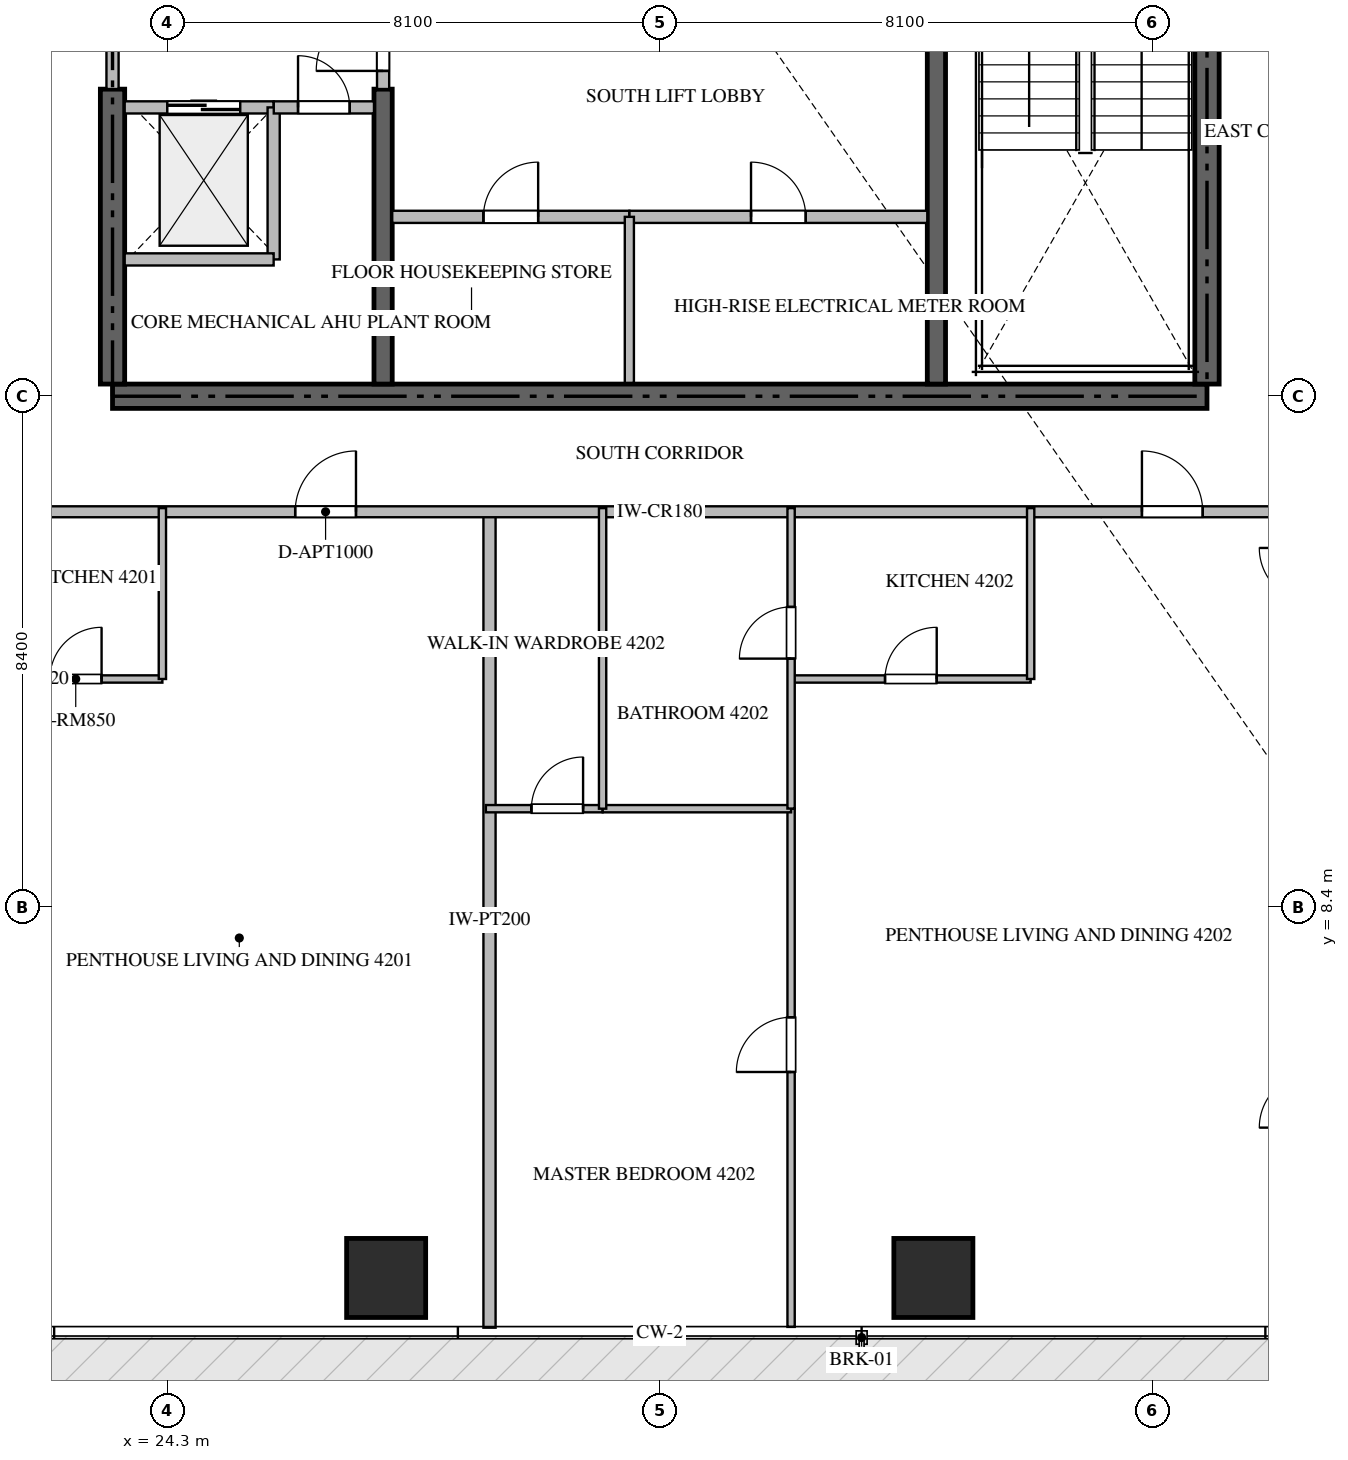
"""IFC4 building model, lengths in metres.
Left out: names, types, materials, properties, quantities, classifications, styles, units other than length and angle.
Written with IfcOpenShell. Run it as: python <this file> out.ifc"""

import sys

from ifc_helpers import new_model, si_unit, direction, frame, frame_2d, origin, origin_2d, place, context, subcontext, project, spatial, rectangle, extrude, source, transform, mapped, element, fill, save


model = new_model("IFC4")
c1 = context("Model", 3, precision=1e-05, world=origin(), true_north=direction((0.0, 1.0)))
c2 = subcontext(c1, "Body", "Model", "MODEL_VIEW")
j1 = project(units=[si_unit("LENGTHUNIT", "METRE"), si_unit("PLANEANGLEUNIT", "RADIAN")], contexts=[c1])
p1 = place(None, origin())
s1 = spatial("IfcSite", under=j1, at=p1, CompositionType="ELEMENT")
p2 = place(p1, origin())
s2 = spatial("IfcBuilding", under=s1, at=p2, CompositionType="ELEMENT")
p3 = place(p2, frame((0.0, 0.0, 168.9)))
s3 = spatial("IfcBuildingStorey", under=s2, at=p3, CompositionType="ELEMENT", Elevation=168.9)
p4 = place(p3, frame((23.4, 16.8, -0.26), z_axis=(0.0, 0.0, 1.0), x_axis=(1.0, 0.0, 0.0)))
e1 = element("IfcWall", 1, at=p4, inside=s3, PredefinedType="SHEAR", context=c2, shape_type="SweptSolid", body=[
    extrude(rectangle(XDim=18.0, YDim=0.4, at=frame_2d((9.0, 0.0))), origin(), (0.0, 0.0, 1.0), 3.748),
])
p5 = place(p3, frame((23.4, 17.0, -0.26), z_axis=(0.0, 0.0, 1.0), x_axis=(0.0, 1.0, 0.0)))
e2 = element("IfcWall", 2, at=p5, inside=s3, PredefinedType="SHEAR", context=c2, shape_type="SweptSolid", body=[
    extrude(rectangle(XDim=4.85, YDim=0.4, at=frame_2d((2.425, 0.0))), origin(), (0.0, 0.0, 1.0), 3.748),
])
p6 = place(p3, frame((41.4, 17.0, -0.26), z_axis=(0.0, 0.0, 1.0), x_axis=(0.0, 1.0, 0.0)))
e3 = element("IfcWall", 3, at=p6, inside=s3, PredefinedType="SHEAR", context=c2, shape_type="SweptSolid", body=[
    extrude(rectangle(XDim=8.35, YDim=0.4, at=frame_2d((4.175, 0.0))), origin(), (0.0, 0.0, 1.0), 3.748),
])
p7 = place(p3, frame((27.85, 17.0, -0.26), z_axis=(0.0, 0.0, 1.0), x_axis=(0.0, 1.0, 0.0)))
e4 = element("IfcWall", 4, at=p7, inside=s3, PredefinedType="SHEAR", context=c2, shape_type="SweptSolid", body=[
    extrude(rectangle(XDim=4.85, YDim=0.3, at=frame_2d((2.425, 0.0))), origin(), (0.0, 0.0, 1.0), 3.748),
])
p8 = place(p3, frame((36.95, 17.0, -0.26), z_axis=(0.0, 0.0, 1.0), x_axis=(0.0, 1.0, 0.0)))
e5 = element("IfcWall", 5, at=p8, inside=s3, PredefinedType="SHEAR", context=c2, shape_type="SweptSolid", body=[
    extrude(rectangle(XDim=8.35, YDim=0.3, at=frame_2d((4.175, 0.0))), origin(), (0.0, 0.0, 1.0), 3.748),
])
m1 = source(origin(), c2, "Body", "SweptSolid", [
    extrude(rectangle(XDim=1.3, YDim=1.3, at=origin_2d()), origin(), (0.0, 0.0, 1.0), 3.75),
])
for number, where, z_axis, x_axis in (
    (6, (27.9, 2.3, -0.26), (0.0, 0.0, 1.0), (1.0, 0.0, 0.0)),
    (7, (36.9, 2.3, -0.26), (0.0, 0.0, 1.0), (1.0, 0.0, 0.0)),
):
    element("IfcColumn", number, at=place(p3, frame(where, z_axis=z_axis, x_axis=x_axis)), inside=s3, PredefinedType="COLUMN", context=c2, shape_type="MappedRepresentation", body=[
        mapped(m1, transform((0.0, 0.0, 0.0), scale=1.0)),
    ])
p9 = place(p3, frame((23.6, 21.55, 0.0), z_axis=(0.0, 0.0, 1.0), x_axis=(1.0, 0.0, 0.0)))
e8 = element("IfcWall", 8, at=p9, inside=s3, PredefinedType="STANDARD", context=c2, shape_type="SweptSolid", body=[
    extrude(rectangle(XDim=2.45, YDim=0.2, at=frame_2d((1.225, 0.0))), origin(), (0.0, 0.0, 1.0), 3.49),
])
p10 = place(p9, frame((0.7, 0.0, 0.0)))
e9 = element("IfcOpeningElement", 9, at=p10, cuts=e8, PredefinedType="OPENING", context=c2, shape_type="SweptSolid", body=[
    extrude(rectangle(XDim=1.2, YDim=2.2, at=frame_2d((0.6, 1.1))), frame((0.0, 0.11, 0.0), z_axis=(0.0, -1.0, 0.0), x_axis=(1.0, 0.0, 0.0)), (0.0, 0.0, 1.0), 0.22),
])
p11 = place(p3, frame((26.05, 19.05, 0.0), z_axis=(0.0, 0.0, 1.0), x_axis=(0.0, 1.0, 0.0)))
e10 = element("IfcWall", 10, at=p11, inside=s3, PredefinedType="STANDARD", context=c2, shape_type="SweptSolid", body=[
    extrude(rectangle(XDim=2.5, YDim=0.2, at=frame_2d((1.25, 0.0))), origin(), (0.0, 0.0, 1.0), 3.49),
])
p12 = place(p3, frame((23.6, 19.05, 0.0), z_axis=(0.0, 0.0, 1.0), x_axis=(1.0, 0.0, 0.0)))
e11 = element("IfcWall", 11, at=p12, inside=s3, PredefinedType="STANDARD", context=c2, shape_type="SweptSolid", body=[
    extrude(rectangle(XDim=2.45, YDim=0.2, at=frame_2d((1.225, 0.0))), origin(), (0.0, 0.0, 1.0), 3.49),
])
p13 = place(p3, frame((26.052, 21.55, 0.0), z_axis=(0.0, 0.0, 1.0), x_axis=(1.0, 0.0, 0.0)))
e12 = element("IfcWall", 12, at=p13, inside=s3, PredefinedType="STANDARD", context=c2, shape_type="SweptSolid", body=[
    extrude(rectangle(XDim=1.648, YDim=0.2, at=frame_2d((0.824, 0.0))), origin(), (0.0, 0.0, 1.0), 3.49),
])
p14 = place(p13, frame((0.399, 0.0, 0.0)))
e13 = element("IfcOpeningElement", 13, at=p14, cuts=e12, PredefinedType="OPENING", context=c2, shape_type="SweptSolid", body=[
    extrude(rectangle(XDim=0.85, YDim=2.1, at=frame_2d((0.425, 1.05))), frame((0.0, 0.11, 0.0), z_axis=(0.0, -1.0, 0.0), x_axis=(1.0, 0.0, 0.0)), (0.0, 0.0, 1.0), 0.22),
])
p15 = place(p3, frame((23.4, 21.852, 0.0), z_axis=(0.0, 0.0, 1.0), x_axis=(0.0, 1.0, 0.0)))
e14 = element("IfcWall", 14, at=p15, inside=s3, PredefinedType="STANDARD", context=c2, shape_type="SweptSolid", body=[
    extrude(rectangle(XDim=2.396, YDim=0.2, at=frame_2d((1.198, 0.0))), origin(), (0.0, 0.0, 1.0), 3.49),
])
p16 = place(p15, frame((0.648, 0.0, 0.0)))
e15 = element("IfcOpeningElement", 15, at=p16, cuts=e14, PredefinedType="OPENING", context=c2, shape_type="SweptSolid", body=[
    extrude(rectangle(XDim=1.1, YDim=2.15, at=frame_2d((0.55, 1.075))), frame((0.0, 0.11, 0.0), z_axis=(0.0, -1.0, 0.0), x_axis=(1.0, 0.0, 0.0)), (0.0, 0.0, 1.0), 0.22),
])
p17 = place(p3, frame((27.85, 21.852, 0.0), z_axis=(0.0, 0.0, 1.0), x_axis=(0.0, 1.0, 0.0)))
e16 = element("IfcWall", 16, at=p17, inside=s3, PredefinedType="STANDARD", context=c2, shape_type="SweptSolid", body=[
    extrude(rectangle(XDim=1.696, YDim=0.2, at=frame_2d((0.848, 0.0))), origin(), (0.0, 0.0, 1.0), 3.49),
])
p18 = place(p17, frame((0.298, 0.0, 0.0)))
e17 = element("IfcOpeningElement", 17, at=p18, cuts=e16, PredefinedType="OPENING", context=c2, shape_type="SweptSolid", body=[
    extrude(rectangle(XDim=1.1, YDim=2.15, at=frame_2d((0.55, 1.075))), frame((0.0, 0.11, 0.0), z_axis=(0.0, -1.0, 0.0), x_axis=(1.0, 0.0, 0.0)), (0.0, 0.0, 1.0), 0.22),
])
p19 = place(p3, frame((28.0, 19.75, 0.0), z_axis=(0.0, 0.0, 1.0), x_axis=(1.0, 0.0, 0.0)))
e18 = element("IfcWall", 18, at=p19, inside=s3, PredefinedType="STANDARD", context=c2, shape_type="SweptSolid", body=[
    extrude(rectangle(XDim=3.9, YDim=0.2, at=frame_2d((1.95, 0.0))), origin(), (0.0, 0.0, 1.0), 3.49),
])
p20 = place(p19, frame((1.5, 0.0, 0.0)))
e19 = element("IfcOpeningElement", 19, at=p20, cuts=e18, PredefinedType="OPENING", context=c2, shape_type="SweptSolid", body=[
    extrude(rectangle(XDim=0.9, YDim=2.1, at=frame_2d((0.45, 1.05))), frame((0.0, 0.11, 0.0), z_axis=(0.0, -1.0, 0.0), x_axis=(1.0, 0.0, 0.0)), (0.0, 0.0, 1.0), 0.22),
])
p21 = place(p3, frame((31.902, 19.75, 0.0), z_axis=(0.0, 0.0, 1.0), x_axis=(1.0, 0.0, 0.0)))
e20 = element("IfcWall", 20, at=p21, inside=s3, PredefinedType="STANDARD", context=c2, shape_type="SweptSolid", body=[
    extrude(rectangle(XDim=4.898, YDim=0.2, at=frame_2d((2.449, 0.0))), origin(), (0.0, 0.0, 1.0), 3.49),
])
p22 = place(p21, frame((1.999, 0.0, 0.0)))
e21 = element("IfcOpeningElement", 21, at=p22, cuts=e20, PredefinedType="OPENING", context=c2, shape_type="SweptSolid", body=[
    extrude(rectangle(XDim=0.9, YDim=2.1, at=frame_2d((0.45, 1.05))), frame((0.0, 0.11, 0.0), z_axis=(0.0, -1.0, 0.0), x_axis=(1.0, 0.0, 0.0)), (0.0, 0.0, 1.0), 0.22),
])
p23 = place(p3, frame((31.9, 17.02, 0.0), z_axis=(0.0, 0.0, 1.0), x_axis=(0.0, 1.0, 0.0)))
e22 = element("IfcWall", 22, at=p23, inside=s3, PredefinedType="PARTITIONING", context=c2, shape_type="SweptSolid", body=[
    extrude(rectangle(XDim=2.73, YDim=0.15, at=frame_2d((1.365, 0.0))), origin(), (0.0, 0.0, 1.0), 3.49),
])
p24 = place(p3, frame((29.6, 1.482, 0.0), z_axis=(0.0, 0.0, 1.0), x_axis=(0.0, 1.0, 0.0)))
e23 = element("IfcWall", 23, at=p24, inside=s3, PredefinedType="PARTITIONING", context=c2, shape_type="SweptSolid", body=[
    extrude(rectangle(XDim=13.418, YDim=0.2, at=frame_2d((6.709, 0.0))), origin(), (0.0, 0.0, 1.0), 3.49),
])
p25 = place(p3, frame((20.952, 14.9, 0.0), z_axis=(0.0, 0.0, 1.0), x_axis=(1.0, 0.0, 0.0)))
e24 = element("IfcWall", 24, at=p25, inside=s3, PredefinedType="PARTITIONING", context=c2, shape_type="SweptSolid", body=[
    extrude(rectangle(XDim=22.896, YDim=0.18, at=frame_2d((11.448, 0.0))), origin(), (0.0, 0.0, 1.0), 3.49),
])
p26 = place(p25, frame((5.452, 0.0, 0.0)))
e25 = element("IfcOpeningElement", 25, at=p26, cuts=e24, PredefinedType="OPENING", context=c2, shape_type="SweptSolid", body=[
    extrude(rectangle(XDim=1.0, YDim=2.15, at=frame_2d((0.5, 1.075))), frame((0.0, 0.1, 0.0), z_axis=(0.0, -1.0, 0.0), x_axis=(1.0, 0.0, 0.0)), (0.0, 0.0, 1.0), 0.2),
])
p27 = place(p25, frame((19.378, 0.0, 0.0)))
e26 = element("IfcOpeningElement", 26, at=p27, cuts=e24, PredefinedType="OPENING", context=c2, shape_type="SweptSolid", body=[
    extrude(rectangle(XDim=1.0, YDim=2.15, at=frame_2d((0.5, 1.075))), frame((0.0, 0.1, 0.0), z_axis=(0.0, -1.0, 0.0), x_axis=(1.0, 0.0, 0.0)), (0.0, 0.0, 1.0), 0.2),
])
p28 = place(p3, frame((21.37, 12.15, 0.0), z_axis=(0.0, 0.0, 1.0), x_axis=(1.0, 0.0, 0.0)))
e27 = element("IfcWall", 27, at=p28, inside=s3, PredefinedType="PARTITIONING", context=c2, shape_type="SweptSolid", body=[
    extrude(rectangle(XDim=2.85, YDim=0.12, at=frame_2d((1.425, 0.0))), origin(), (0.0, 0.0, 1.0), 3.49),
])
p29 = place(p28, frame((1.0, 0.0, 0.0)))
e28 = element("IfcOpeningElement", 28, at=p29, cuts=e27, PredefinedType="OPENING", context=c2, shape_type="SweptSolid", body=[
    extrude(rectangle(XDim=0.85, YDim=2.1, at=frame_2d((0.425, 1.05))), frame((0.0, 0.07, 0.0), z_axis=(0.0, -1.0, 0.0), x_axis=(1.0, 0.0, 0.0)), (0.0, 0.0, 1.0), 0.14),
])
p30 = place(p3, frame((24.22, 12.15, 0.0), z_axis=(0.0, 0.0, 1.0), x_axis=(0.0, 1.0, 0.0)))
e29 = element("IfcWall", 29, at=p30, inside=s3, PredefinedType="PARTITIONING", context=c2, shape_type="SweptSolid", body=[
    extrude(rectangle(XDim=2.81, YDim=0.12, at=frame_2d((1.405, 0.0))), origin(), (0.0, 0.0, 1.0), 3.49),
])
p31 = place(p3, frame((34.56, 12.15, 0.0), z_axis=(0.0, 0.0, 1.0), x_axis=(1.0, 0.0, 0.0)))
e30 = element("IfcWall", 30, at=p31, inside=s3, PredefinedType="PARTITIONING", context=c2, shape_type="SweptSolid", body=[
    extrude(rectangle(XDim=3.94, YDim=0.12, at=frame_2d((1.97, 0.0))), origin(), (0.0, 0.0, 1.0), 3.49),
])
p32 = place(p31, frame((1.545, 0.0, 0.0)))
e31 = element("IfcOpeningElement", 31, at=p32, cuts=e30, PredefinedType="OPENING", context=c2, shape_type="SweptSolid", body=[
    extrude(rectangle(XDim=0.85, YDim=2.1, at=frame_2d((0.425, 1.05))), frame((0.0, 0.07, 0.0), z_axis=(0.0, -1.0, 0.0), x_axis=(1.0, 0.0, 0.0)), (0.0, 0.0, 1.0), 0.14),
])
p33 = place(p3, frame((38.5, 12.15, 0.0), z_axis=(0.0, 0.0, 1.0), x_axis=(0.0, 1.0, 0.0)))
e32 = element("IfcWall", 32, at=p33, inside=s3, PredefinedType="PARTITIONING", context=c2, shape_type="SweptSolid", body=[
    extrude(rectangle(XDim=2.81, YDim=0.12, at=frame_2d((1.405, 0.0))), origin(), (0.0, 0.0, 1.0), 3.49),
])
p34 = place(p3, frame((34.56, 1.495, 0.0), z_axis=(0.0, 0.0, 1.0), x_axis=(0.0, 1.0, 0.0)))
e33 = element("IfcWall", 33, at=p34, inside=s3, PredefinedType="PARTITIONING", context=c2, shape_type="SweptSolid", body=[
    extrude(rectangle(XDim=8.522, YDim=0.12, at=frame_2d((4.261, 0.0))), origin(), (0.0, 0.0, 1.0), 3.49),
])
p35 = place(p34, frame((4.192, 0.0, 0.0)))
e34 = element("IfcOpeningElement", 34, at=p35, cuts=e33, PredefinedType="OPENING", context=c2, shape_type="SweptSolid", body=[
    extrude(rectangle(XDim=0.9, YDim=2.1, at=frame_2d((0.45, 1.05))), frame((0.0, 0.07, 0.0), z_axis=(0.0, -1.0, 0.0), x_axis=(1.0, 0.0, 0.0)), (0.0, 0.0, 1.0), 0.14),
])
p36 = place(p3, frame((29.54, 10.017, 0.0), z_axis=(0.0, 0.0, 1.0), x_axis=(1.0, 0.0, 0.0)))
e35 = element("IfcWall", 35, at=p36, inside=s3, PredefinedType="PARTITIONING", context=c2, shape_type="SweptSolid", body=[
    extrude(rectangle(XDim=1.92, YDim=0.12, at=frame_2d((0.96, 0.0))), origin(), (0.0, 0.0, 1.0), 3.49),
])
p37 = place(p36, frame((0.749, 0.0, 0.0)))
e36 = element("IfcOpeningElement", 36, at=p37, cuts=e35, PredefinedType="OPENING", context=c2, shape_type="SweptSolid", body=[
    extrude(rectangle(XDim=0.85, YDim=2.1, at=frame_2d((0.425, 1.05))), frame((0.0, 0.07, 0.0), z_axis=(0.0, -1.0, 0.0), x_axis=(1.0, 0.0, 0.0)), (0.0, 0.0, 1.0), 0.14),
])
p38 = place(p3, frame((31.462, 10.017, 0.0), z_axis=(0.0, 0.0, 1.0), x_axis=(1.0, 0.0, 0.0)))
e37 = element("IfcWall", 37, at=p38, inside=s3, PredefinedType="PARTITIONING", context=c2, shape_type="SweptSolid", body=[
    extrude(rectangle(XDim=3.098, YDim=0.12, at=frame_2d((1.549, 0.0))), origin(), (0.0, 0.0, 1.0), 3.49),
])
p39 = place(p3, frame((31.46, 10.017, 0.0), z_axis=(0.0, 0.0, 1.0), x_axis=(0.0, 1.0, 0.0)))
e38 = element("IfcWall", 38, at=p39, inside=s3, PredefinedType="PARTITIONING", context=c2, shape_type="SweptSolid", body=[
    extrude(rectangle(XDim=4.943, YDim=0.12, at=frame_2d((2.471, 0.0))), origin(), (0.0, 0.0, 1.0), 3.49),
])
p40 = place(p3, frame((34.56, 10.019, 0.0), z_axis=(0.0, 0.0, 1.0), x_axis=(0.0, 1.0, 0.0)))
e39 = element("IfcWall", 39, at=p40, inside=s3, PredefinedType="PARTITIONING", context=c2, shape_type="SweptSolid", body=[
    extrude(rectangle(XDim=4.941, YDim=0.12, at=frame_2d((2.47, 0.0))), origin(), (0.0, 0.0, 1.0), 3.49),
])
p41 = place(p40, frame((2.466, 0.0, 0.0)))
e40 = element("IfcOpeningElement", 40, at=p41, cuts=e39, PredefinedType="OPENING", context=c2, shape_type="SweptSolid", body=[
    extrude(rectangle(XDim=0.85, YDim=2.1, at=frame_2d((0.425, 1.05))), frame((0.0, 0.07, 0.0), z_axis=(0.0, -1.0, 0.0), x_axis=(1.0, 0.0, 0.0)), (0.0, 0.0, 1.0), 0.14),
])
m2 = source(origin(), c2, "Body", "SweptSolid", [
    extrude(rectangle(XDim=1.2, YDim=2.2, at=frame_2d((0.6, 1.1))), frame((0.0, 0.025, 0.0), z_axis=(0.0, -1.0, 0.0), x_axis=(1.0, 0.0, 0.0)), (0.0, 0.0, 1.0), 0.05),
])
p42 = place(p10, origin())
e41 = element("IfcDoor", 41, at=p42, inside=s3, OperationType="DOUBLE_DOOR_SLIDING", PredefinedType="DOOR", context=c2, shape_type="MappedRepresentation", body=[
    mapped(m2, transform((0.0, 0.0, 0.0), scale=1.0)),
])
fill(e9, e41)
m3 = source(origin(), c2, "Body", "SweptSolid", [
    extrude(rectangle(XDim=0.85, YDim=2.1, at=frame_2d((0.425, 1.05))), frame((0.0, 0.025, 0.0), z_axis=(0.0, -1.0, 0.0), x_axis=(1.0, 0.0, 0.0)), (0.0, 0.0, 1.0), 0.05),
])
p43 = place(p14, origin())
e42 = element("IfcDoor", 42, at=p43, inside=s3, OperationType="SINGLE_SWING_LEFT", PredefinedType="DOOR", context=c2, shape_type="MappedRepresentation", body=[
    mapped(m3, transform((0.0, 0.0, 0.0), scale=1.0)),
])
fill(e13, e42)
m4 = source(origin(), c2, "Body", "SweptSolid", [
    extrude(rectangle(XDim=1.1, YDim=2.15, at=frame_2d((0.55, 1.075))), frame((0.0, 0.025, 0.0), z_axis=(0.0, -1.0, 0.0), x_axis=(1.0, 0.0, 0.0)), (0.0, 0.0, 1.0), 0.05),
])
p44 = place(p18, origin())
e43 = element("IfcDoor", 43, at=p44, inside=s3, OperationType="SINGLE_SWING_LEFT", PredefinedType="DOOR", context=c2, shape_type="MappedRepresentation", body=[
    mapped(m4, transform((0.0, 0.0, 0.0), scale=1.0)),
])
fill(e17, e43)
m5 = source(origin(), c2, "Body", "SweptSolid", [
    extrude(rectangle(XDim=0.9, YDim=2.1, at=frame_2d((0.45, 1.05))), frame((0.0, 0.025, 0.0), z_axis=(0.0, -1.0, 0.0), x_axis=(1.0, 0.0, 0.0)), (0.0, 0.0, 1.0), 0.05),
])
p45 = place(p20, origin())
e44 = element("IfcDoor", 44, at=p45, inside=s3, OperationType="SINGLE_SWING_RIGHT", PredefinedType="DOOR", context=c2, shape_type="MappedRepresentation", body=[
    mapped(m5, transform((0.0, 0.0, 0.0), scale=1.0)),
])
fill(e19, e44)
p46 = place(p22, origin())
e45 = element("IfcDoor", 45, at=p46, inside=s3, OperationType="SINGLE_SWING_LEFT", PredefinedType="DOOR", context=c2, shape_type="MappedRepresentation", body=[
    mapped(m5, transform((0.0, 0.0, 0.0), scale=1.0)),
])
fill(e21, e45)
m6 = source(origin(), c2, "Body", "SweptSolid", [
    extrude(rectangle(XDim=1.0, YDim=2.15, at=frame_2d((0.5, 1.075))), frame((0.0, 0.025, 0.0), z_axis=(0.0, -1.0, 0.0), x_axis=(1.0, 0.0, 0.0)), (0.0, 0.0, 1.0), 0.05),
])
p47 = place(p26, origin())
e46 = element("IfcDoor", 46, at=p47, inside=s3, OperationType="SINGLE_SWING_RIGHT", PredefinedType="DOOR", context=c2, shape_type="MappedRepresentation", body=[
    mapped(m6, transform((0.0, 0.0, 0.0), scale=1.0)),
])
fill(e25, e46)
p48 = place(p27, origin())
e47 = element("IfcDoor", 47, at=p48, inside=s3, OperationType="SINGLE_SWING_LEFT", PredefinedType="DOOR", context=c2, shape_type="MappedRepresentation", body=[
    mapped(m6, transform((0.0, 0.0, 0.0), scale=1.0)),
])
fill(e26, e47)
p49 = place(p29, origin())
e48 = element("IfcDoor", 48, at=p49, inside=s3, OperationType="SINGLE_SWING_RIGHT", PredefinedType="DOOR", context=c2, shape_type="MappedRepresentation", body=[
    mapped(m3, transform((0.0, 0.0, 0.0), scale=1.0)),
])
fill(e28, e48)
p50 = place(p32, origin())
e49 = element("IfcDoor", 49, at=p50, inside=s3, OperationType="SINGLE_SWING_RIGHT", PredefinedType="DOOR", context=c2, shape_type="MappedRepresentation", body=[
    mapped(m3, transform((0.0, 0.0, 0.0), scale=1.0)),
])
fill(e31, e49)
p51 = place(p35, origin())
e50 = element("IfcDoor", 50, at=p51, inside=s3, OperationType="SINGLE_SWING_LEFT", PredefinedType="DOOR", context=c2, shape_type="MappedRepresentation", body=[
    mapped(m5, transform((0.0, 0.0, 0.0), scale=1.0)),
])
fill(e34, e50)
p52 = place(p37, origin())
e51 = element("IfcDoor", 51, at=p52, inside=s3, OperationType="SINGLE_SWING_RIGHT", PredefinedType="DOOR", context=c2, shape_type="MappedRepresentation", body=[
    mapped(m3, transform((0.0, 0.0, 0.0), scale=1.0)),
])
fill(e36, e51)
p53 = place(p41, origin())
e52 = element("IfcDoor", 52, at=p53, inside=s3, OperationType="SINGLE_SWING_LEFT", PredefinedType="DOOR", context=c2, shape_type="MappedRepresentation", body=[
    mapped(m3, transform((0.0, 0.0, 0.0), scale=1.0)),
])
fill(e40, e52)
save(model, sys.argv[1])
